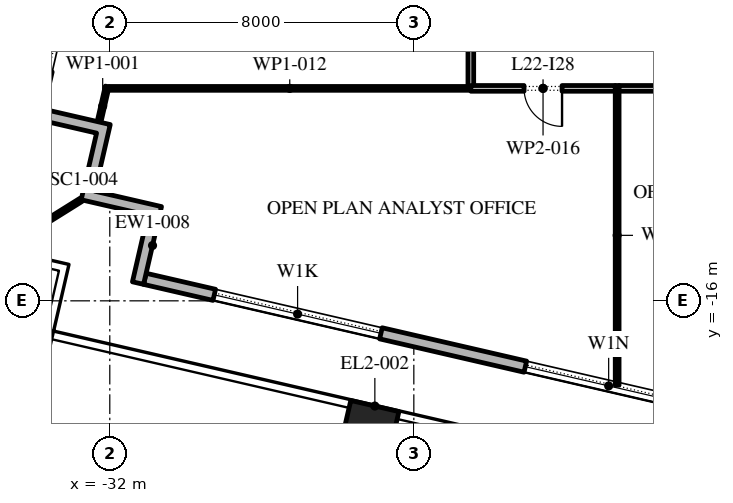
"""IFC4 building model, lengths in metres.
Left out: names, types, materials, properties, quantities, classifications, styles, units other than length and angle.
Written with IfcOpenShell. Run it as: python <this file> out.ifc"""

import sys

from ifc_helpers import new_model, si_unit, direction, frame, frame_2d, origin, origin_2d, place, context, subcontext, project, spatial, polyline, rectangle, outline, extrude, element, fill, save


model = new_model("IFC4")
c1 = context("Model", 3, precision=1e-05, world=origin(), true_north=direction((0.0, 1.0)))
c2 = subcontext(c1, "Body", "Model", "MODEL_VIEW")
j1 = project(units=[si_unit("LENGTHUNIT", "METRE"), si_unit("PLANEANGLEUNIT", "RADIAN")], contexts=[c1])
p1 = place(None, origin())
s1 = spatial("IfcSite", under=j1, at=p1, CompositionType="ELEMENT")
p2 = place(p1, origin())
s2 = spatial("IfcBuilding", under=s1, at=p2, CompositionType="ELEMENT")
p3 = place(p2, frame((0.0, 0.0, 105.6)))
s3 = spatial("IfcBuildingStorey", under=s2, at=p3, CompositionType="ELEMENT", Elevation=105.6)
for number, where, z_axis, x_axis in (
    (1, (-34.282, -17.298, 0.0), (0.0, 0.0, 1.0), (0.974, -0.225, 0.0)),
    (2, (-25.172, -19.402, 0.0), (0.0, 0.0, 1.0), (0.974, -0.225, 0.0)),
):
    element("IfcColumn", number, at=place(p3, frame(where, z_axis=z_axis, x_axis=x_axis)), inside=s3, PredefinedType="COLUMN", context=c2, shape_type="SweptSolid", body=[
        extrude(rectangle(XDim=1.3, YDim=1.3, at=origin_2d()), origin(), (0.0, 0.0, 1.0), 4.2),
    ])
p4 = place(p3, frame((-31.078, -15.421, 0.0), z_axis=(0.0, 0.0, 1.0), x_axis=(0.974370456532, -0.224949357493, 0.0)))
e3 = element("IfcWall", 3, at=p4, inside=s3, PredefinedType="STANDARD", context=c2, shape_type="SweptSolid", body=[
    extrude(rectangle(XDim=51.0, YDim=0.3, at=frame_2d((25.5, 0.0))), origin(), (0.0, 0.0, 1.0), 4.0),
])
p5 = place(p4, frame((1.875, 0.0, 0.45)))
e4 = element("IfcOpeningElement", 4, at=p5, cuts=e3, PredefinedType="OPENING", context=c2, shape_type="SweptSolid", body=[
    extrude(rectangle(XDim=4.5, YDim=2.65, at=frame_2d((2.25, 1.325))), frame((0.0, 0.16, 0.0), z_axis=(0.0, -1.0, 0.0), x_axis=(1.0, 0.0, 0.0)), (0.0, 0.0, 1.0), 0.32),
])
p6 = place(p4, frame((10.275, 0.0, 0.45)))
e5 = element("IfcOpeningElement", 5, at=p6, cuts=e3, PredefinedType="OPENING", context=c2, shape_type="SweptSolid", body=[
    extrude(rectangle(XDim=4.5, YDim=2.525, at=frame_2d((2.25, 1.262))), frame((0.0, 0.16, 0.0), z_axis=(0.0, -1.0, 0.0), x_axis=(1.0, 0.0, 0.0)), (0.0, 0.0, 1.0), 0.32),
])
p7 = place(p4, frame((18.825, 0.0, 0.45)))
e6 = element("IfcOpeningElement", 6, at=p7, cuts=e3, PredefinedType="OPENING", context=c2, shape_type="SweptSolid", body=[
    extrude(rectangle(XDim=4.5, YDim=2.5, at=frame_2d((2.25, 1.25))), frame((0.0, 0.16, 0.0), z_axis=(0.0, -1.0, 0.0), x_axis=(1.0, 0.0, 0.0)), (0.0, 0.0, 1.0), 0.32),
])
p8 = place(p4, frame((27.075, 0.0, 0.0)))
e7 = element("IfcOpeningElement", 7, at=p8, cuts=e3, PredefinedType="OPENING", context=c2, shape_type="SweptSolid", body=[
    extrude(rectangle(XDim=2.4, YDim=2.9, at=frame_2d((1.2, 1.45))), frame((0.0, 0.16, 0.0), z_axis=(0.0, -1.0, 0.0), x_axis=(1.0, 0.0, 0.0)), (0.0, 0.0, 1.0), 0.32),
])
p9 = place(p4, frame((35.925, 0.0, 0.45)))
e8 = element("IfcOpeningElement", 8, at=p9, cuts=e3, PredefinedType="OPENING", context=c2, shape_type="SweptSolid", body=[
    extrude(rectangle(XDim=4.5, YDim=2.45, at=frame_2d((2.25, 1.225))), frame((0.0, 0.16, 0.0), z_axis=(0.0, -1.0, 0.0), x_axis=(1.0, 0.0, 0.0)), (0.0, 0.0, 1.0), 0.32),
])
p10 = place(p4, frame((44.475, 0.0, 0.45)))
e9 = element("IfcOpeningElement", 9, at=p10, cuts=e3, PredefinedType="OPENING", context=c2, shape_type="SweptSolid", body=[
    extrude(rectangle(XDim=4.5, YDim=2.45, at=frame_2d((2.25, 1.225))), frame((0.0, 0.16, 0.0), z_axis=(0.0, -1.0, 0.0), x_axis=(1.0, 0.0, 0.0)), (0.0, 0.0, 1.0), 0.32),
])
p11 = place(p3, frame((-22.82, 37.016, 0.0), z_axis=(0.0, 0.0, 1.0), x_axis=(-0.224953880882, -0.974369412223, 0.0)))
e10 = element("IfcWall", 10, at=p11, inside=s3, PredefinedType="STANDARD", context=c2, shape_type="SweptSolid", body=[
    extrude(rectangle(XDim=49.5, YDim=0.3, at=frame_2d((24.75, 0.0))), origin(), (0.0, 0.0, 1.0), 4.0),
])
p12 = place(p11, frame((1.157, 0.0, 0.45)))
e11 = element("IfcOpeningElement", 11, at=p12, cuts=e10, PredefinedType="OPENING", context=c2, shape_type="SweptSolid", body=[
    extrude(rectangle(XDim=4.5, YDim=3.05, at=frame_2d((2.25, 1.525))), frame((0.0, 0.16, 0.0), z_axis=(0.0, -1.0, 0.0), x_axis=(1.0, 0.0, 0.0)), (0.0, 0.0, 1.0), 0.32),
])
p13 = place(p11, frame((8.121, 0.0, 0.45)))
e12 = element("IfcOpeningElement", 12, at=p13, cuts=e10, PredefinedType="OPENING", context=c2, shape_type="SweptSolid", body=[
    extrude(rectangle(XDim=4.5, YDim=3.05, at=frame_2d((2.25, 1.525))), frame((0.0, 0.16, 0.0), z_axis=(0.0, -1.0, 0.0), x_axis=(1.0, 0.0, 0.0)), (0.0, 0.0, 1.0), 0.32),
])
p14 = place(p11, frame((15.236, 0.0, 0.45)))
e13 = element("IfcOpeningElement", 13, at=p14, cuts=e10, PredefinedType="OPENING", context=c2, shape_type="SweptSolid", body=[
    extrude(rectangle(XDim=4.5, YDim=3.05, at=frame_2d((2.25, 1.525))), frame((0.0, 0.16, 0.0), z_axis=(0.0, -1.0, 0.0), x_axis=(1.0, 0.0, 0.0)), (0.0, 0.0, 1.0), 0.32),
])
p15 = place(p11, frame((23.4, 0.0, 0.0)))
e14 = element("IfcOpeningElement", 14, at=p15, cuts=e10, PredefinedType="OPENING", context=c2, shape_type="SweptSolid", body=[
    extrude(rectangle(XDim=2.4, YDim=3.5, at=frame_2d((1.2, 1.75))), frame((0.0, 0.16, 0.0), z_axis=(0.0, -1.0, 0.0), x_axis=(1.0, 0.0, 0.0)), (0.0, 0.0, 1.0), 0.32),
])
p16 = place(p11, frame((29.464, 0.0, 0.45)))
e15 = element("IfcOpeningElement", 15, at=p16, cuts=e10, PredefinedType="OPENING", context=c2, shape_type="SweptSolid", body=[
    extrude(rectangle(XDim=4.5, YDim=2.875, at=frame_2d((2.25, 1.438))), frame((0.0, 0.16, 0.0), z_axis=(0.0, -1.0, 0.0), x_axis=(1.0, 0.0, 0.0)), (0.0, 0.0, 1.0), 0.32),
])
p17 = place(p11, frame((36.579, 0.0, 0.45)))
e16 = element("IfcOpeningElement", 16, at=p17, cuts=e10, PredefinedType="OPENING", context=c2, shape_type="SweptSolid", body=[
    extrude(rectangle(XDim=4.5, YDim=2.675, at=frame_2d((2.25, 1.337))), frame((0.0, 0.16, 0.0), z_axis=(0.0, -1.0, 0.0), x_axis=(1.0, 0.0, 0.0)), (0.0, 0.0, 1.0), 0.32),
])
p18 = place(p11, frame((43.693, 0.0, 0.45)))
e17 = element("IfcOpeningElement", 17, at=p18, cuts=e10, PredefinedType="OPENING", context=c2, shape_type="SweptSolid", body=[
    extrude(rectangle(XDim=4.5, YDim=3.05, at=frame_2d((2.25, 1.525))), frame((0.0, 0.16, 0.0), z_axis=(0.0, -1.0, 0.0), x_axis=(1.0, 0.0, 0.0)), (0.0, 0.0, 1.0), 0.32),
])
p19 = place(p3, origin())
e18 = element("IfcWall", 18, at=p19, inside=s3, PredefinedType="STANDARD", context=c2, shape_type="SweptSolid", body=[
    extrude(outline(polyline([(-32.393, -13.116), (-30.639, -13.521), (-31.111, -15.567), (-31.404, -15.5), (-30.999, -13.746), (-32.753, -13.341), (-32.348, -11.587), (-33.809, -11.25), (-33.742, -10.957), (-31.988, -11.362), (-32.393, -13.116)])), origin(), (0.0, 0.0, 1.0), 4.0),
])
p20 = place(p3, frame((-32.753, -13.341, -0.05), z_axis=(0.0, 0.0, 1.0), x_axis=(-0.848059759764, -0.529900598103, 0.0)))
e19 = element("IfcWall", 19, at=p20, inside=s3, PredefinedType="STANDARD", context=c2, shape_type="SweptSolid", body=[
    extrude(rectangle(XDim=2.455, YDim=0.1, at=frame_2d((1.228, 0.0))), origin(), (0.0, 0.0, 1.0), 4.05),
])
p21 = place(p3, frame((-32.069, -10.361, 0.0), z_axis=(0.0, 0.0, 1.0), x_axis=(-0.222987762652, -0.974821243976, 0.0)))
e20 = element("IfcWall", 20, at=p21, inside=s3, PredefinedType="PARTITIONING", context=c2, shape_type="SweptSolid", body=[
    extrude(rectangle(XDim=1.058, YDim=0.1, at=frame_2d((0.529, 0.0))), origin(), (0.0, 0.0, 1.0), 4.0),
])
p22 = place(p3, frame((-22.5, -10.41, 0.0), z_axis=(0.0, 0.0, 1.0), x_axis=(-1.0, 0.0, 0.0)))
e21 = element("IfcWall", 21, at=p22, inside=s3, PredefinedType="PARTITIONING", context=c2, shape_type="SweptSolid", body=[
    extrude(rectangle(XDim=9.53, YDim=0.1, at=frame_2d((4.765, 0.0))), origin(), (0.0, 0.0, 1.0), 4.0),
])
p23 = place(p3, frame((-22.5, -10.36, 0.0), z_axis=(0.0, 0.0, 1.0), x_axis=(0.0, 1.0, 0.0)))
e22 = element("IfcWall", 22, at=p23, inside=s3, PredefinedType="PARTITIONING", context=c2, shape_type="SweptSolid", body=[
    extrude(rectangle(XDim=2.735, YDim=0.15, at=frame_2d((1.368, 0.0))), origin(), (0.0, 0.0, 1.0), 4.0),
])
p24 = place(p3, frame((-18.65, -18.219, 0.0), z_axis=(0.0, 0.0, 1.0), x_axis=(0.0, 1.0, 0.0)))
e23 = element("IfcWall", 23, at=p24, inside=s3, PredefinedType="PARTITIONING", context=c2, shape_type="SweptSolid", body=[
    extrude(rectangle(XDim=7.884, YDim=0.1, at=frame_2d((3.942, 0.0))), origin(), (0.0, 0.0, 1.0), 4.0),
])
p25 = place(p3, frame((-18.7, -10.41, 0.0), z_axis=(0.0, 0.0, 1.0), x_axis=(-1.0, 0.0, 0.0)))
e24 = element("IfcWall", 24, at=p25, inside=s3, PredefinedType="PARTITIONING", context=c2, shape_type="SweptSolid", body=[
    extrude(rectangle(XDim=3.8, YDim=0.15, at=frame_2d((1.9, 0.0))), origin(), (0.0, 0.0, 1.0), 4.0),
])
p26 = place(p25, frame((1.4, 0.0, 0.0)))
e25 = element("IfcOpeningElement", 25, at=p26, cuts=e24, PredefinedType="OPENING", context=c2, shape_type="SweptSolid", body=[
    extrude(rectangle(XDim=1.0, YDim=2.1, at=frame_2d((0.5, 1.05))), frame((0.0, 0.085, 0.0), z_axis=(0.0, -1.0, 0.0), x_axis=(1.0, 0.0, 0.0)), (0.0, 0.0, 1.0), 0.17),
])
p27 = place(p3, frame((-14.72, -10.41, 0.0), z_axis=(0.0, 0.0, 1.0), x_axis=(-1.0, 0.0, 0.0)))
e26 = element("IfcWall", 26, at=p27, inside=s3, PredefinedType="PARTITIONING", context=c2, shape_type="SweptSolid", body=[
    extrude(rectangle(XDim=3.88, YDim=0.15, at=frame_2d((1.94, 0.0))), origin(), (0.0, 0.0, 1.0), 4.0),
])
p28 = place(p27, frame((1.03, 0.0, 0.0)))
e27 = element("IfcOpeningElement", 27, at=p28, cuts=e26, PredefinedType="OPENING", context=c2, shape_type="SweptSolid", body=[
    extrude(rectangle(XDim=1.0, YDim=2.1, at=frame_2d((0.5, 1.05))), frame((0.0, 0.085, 0.0), z_axis=(0.0, -1.0, 0.0), x_axis=(1.0, 0.0, 0.0)), (0.0, 0.0, 1.0), 0.17),
])
p29 = place(p5, origin())
e28 = element("IfcWindow", 28, at=p29, inside=s3, PartitioningType="DOUBLE_PANEL_VERTICAL", PredefinedType="WINDOW", context=c2, shape_type="SweptSolid", body=[
    extrude(rectangle(XDim=4.5, YDim=2.65, at=frame_2d((2.25, 1.325))), frame((0.0, 0.03, 0.0), z_axis=(0.0, -1.0, 0.0), x_axis=(1.0, 0.0, 0.0)), (0.0, 0.0, 1.0), 0.06),
])
fill(e4, e28)
p30 = place(p6, origin())
e29 = element("IfcWindow", 29, at=p30, inside=s3, PartitioningType="DOUBLE_PANEL_VERTICAL", PredefinedType="WINDOW", context=c2, shape_type="SweptSolid", body=[
    extrude(rectangle(XDim=4.5, YDim=2.525, at=frame_2d((2.25, 1.262))), frame((0.0, 0.03, 0.0), z_axis=(0.0, -1.0, 0.0), x_axis=(1.0, 0.0, 0.0)), (0.0, 0.0, 1.0), 0.06),
])
fill(e5, e29)
p31 = place(p18, origin())
e30 = element("IfcWindow", 30, at=p31, inside=s3, PartitioningType="DOUBLE_PANEL_VERTICAL", PredefinedType="WINDOW", context=c2, shape_type="SweptSolid", body=[
    extrude(rectangle(XDim=4.5, YDim=3.05, at=frame_2d((2.25, 1.525))), frame((0.0, 0.03, 0.0), z_axis=(0.0, -1.0, 0.0), x_axis=(1.0, 0.0, 0.0)), (0.0, 0.0, 1.0), 0.06),
])
fill(e17, e30)
p32 = place(p26, origin())
e31 = element("IfcDoor", 31, at=p32, inside=s3, OperationType="SINGLE_SWING_RIGHT", PredefinedType="DOOR", context=c2, shape_type="SweptSolid", body=[
    extrude(rectangle(XDim=1.0, YDim=2.1, at=frame_2d((0.5, 1.05))), frame((0.0, 0.025, 0.0), z_axis=(0.0, -1.0, 0.0), x_axis=(1.0, 0.0, 0.0)), (0.0, 0.0, 1.0), 0.05),
])
fill(e25, e31)
save(model, sys.argv[1])
